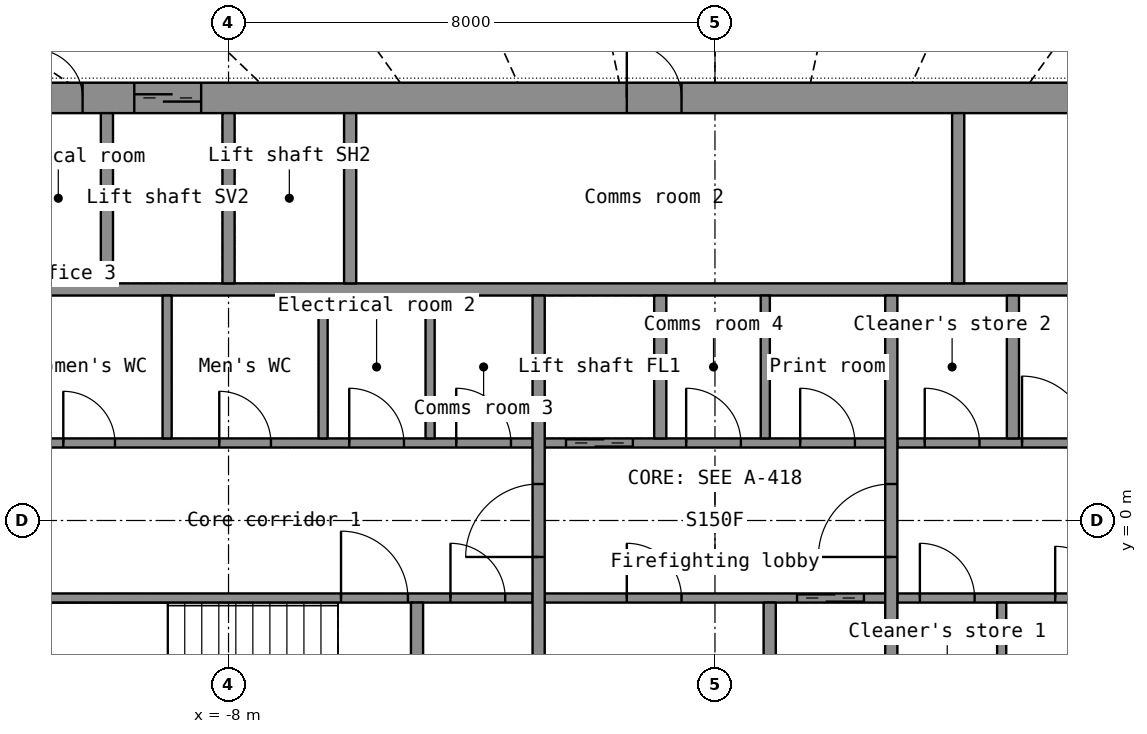
"""IFC4 building model, lengths in metres.
Left out: names, types, materials, properties, quantities, classifications, styles, units other than length and angle.
Written with IfcOpenShell. Run it as: python <this file> out.ifc"""

import sys

from ifc_helpers import new_model, si_unit, direction, frame, frame_2d, origin, place, context, subcontext, project, spatial, rectangle, extrude, element, fill, save


model = new_model("IFC4")
c1 = context("Model", 3, precision=1e-05, world=origin(), true_north=direction((0.0, 1.0)))
c2 = subcontext(c1, "Body", "Model", "MODEL_VIEW")
j1 = project(units=[si_unit("LENGTHUNIT", "METRE"), si_unit("PLANEANGLEUNIT", "RADIAN")], contexts=[c1])
p1 = place(None, origin())
s1 = spatial("IfcSite", under=j1, at=p1, CompositionType="ELEMENT")
p2 = place(p1, origin())
s2 = spatial("IfcBuilding", under=s1, at=p2, CompositionType="ELEMENT")
p3 = place(p2, frame((0.0, 0.0, 137.8)))
s3 = spatial("IfcBuildingStorey", under=s2, at=p3, CompositionType="ELEMENT", Elevation=137.8)
p4 = place(p3, frame((-11.5, 6.95, 0.0), z_axis=(0.0, 0.0, 1.0), x_axis=(1.0, 0.0, 0.0)))
e1 = element("IfcWall", 1, at=p4, inside=s3, PredefinedType="SHEAR", context=c2, shape_type="SweptSolid", body=[
    extrude(rectangle(XDim=23.0, YDim=0.5, at=frame_2d((11.5, 0.0))), origin(), (0.0, 0.0, 1.0), 3.3),
])
p5 = place(p4, frame((1.95, 0.0, 0.0)))
e2 = element("IfcOpeningElement", 2, at=p5, cuts=e1, PredefinedType="OPENING", context=c2, shape_type="SweptSolid", body=[
    extrude(rectangle(XDim=1.1, YDim=2.2, at=frame_2d((0.55, 1.1))), frame((0.0, 0.26, 0.0), z_axis=(0.0, -1.0, 0.0), x_axis=(1.0, 0.0, 0.0)), (0.0, 0.0, 1.0), 0.52),
])
p6 = place(p4, frame((10.05, 0.0, 0.0)))
e3 = element("IfcOpeningElement", 3, at=p6, cuts=e1, PredefinedType="OPENING", context=c2, shape_type="SweptSolid", body=[
    extrude(rectangle(XDim=0.9, YDim=2.1, at=frame_2d((0.45, 1.05))), frame((0.0, 0.26, 0.0), z_axis=(0.0, -1.0, 0.0), x_axis=(1.0, 0.0, 0.0)), (0.0, 0.0, 1.0), 0.52),
])
p7 = place(p4, frame((18.05, 0.0, 0.0)))
e4 = element("IfcOpeningElement", 4, at=p7, cuts=e1, PredefinedType="OPENING", context=c2, shape_type="SweptSolid", body=[
    extrude(rectangle(XDim=0.9, YDim=2.1, at=frame_2d((0.45, 1.05))), frame((0.0, 0.26, 0.0), z_axis=(0.0, -1.0, 0.0), x_axis=(1.0, 0.0, 0.0)), (0.0, 0.0, 1.0), 0.52),
])
p8 = place(p4, frame((0.3, 0.0, 0.0)))
e5 = element("IfcOpeningElement", 5, at=p8, cuts=e1, PredefinedType="OPENING", context=c2, shape_type="SweptSolid", body=[
    extrude(rectangle(XDim=0.8, YDim=2.05, at=frame_2d((0.4, 1.025))), frame((0.0, 0.26, 0.0), z_axis=(0.0, -1.0, 0.0), x_axis=(1.0, 0.0, 0.0)), (0.0, 0.0, 1.0), 0.52),
])
p9 = place(p4, frame((21.9, 0.0, 0.0)))
e6 = element("IfcOpeningElement", 6, at=p9, cuts=e1, PredefinedType="OPENING", context=c2, shape_type="SweptSolid", body=[
    extrude(rectangle(XDim=0.8, YDim=2.05, at=frame_2d((0.4, 1.025))), frame((0.0, 0.26, 0.0), z_axis=(0.0, -1.0, 0.0), x_axis=(1.0, 0.0, 0.0)), (0.0, 0.0, 1.0), 0.52),
])
p10 = place(p3, frame((-11.5, 3.8, 0.0), z_axis=(0.0, 0.0, 1.0), x_axis=(1.0, 0.0, 0.0)))
e7 = element("IfcWall", 7, at=p10, inside=s3, PredefinedType="SHEAR", context=c2, shape_type="SweptSolid", body=[
    extrude(rectangle(XDim=23.0, YDim=0.2, at=frame_2d((11.5, 0.0))), origin(), (0.0, 0.0, 1.0), 3.3),
])
for number, where, z_axis, x_axis in (
    (8, (-10.0, 3.9, 0.0), (0.0, 0.0, 1.0), (0.0, 1.0, 0.0)),
    (9, (-8.0, 3.9, 0.0), (0.0, 0.0, 1.0), (0.0, 1.0, 0.0)),
    (10, (-6.0, 3.9, 0.0), (0.0, 0.0, 1.0), (0.0, 1.0, 0.0)),
):
    element("IfcWall", number, at=place(p3, frame(where, z_axis=z_axis, x_axis=x_axis)), inside=s3, PredefinedType="SHEAR", context=c2, shape_type="SweptSolid", body=[
        extrude(rectangle(XDim=2.8, YDim=0.2, at=frame_2d((1.4, 0.0))), origin(), (0.0, 0.0, 1.0), 3.3),
    ])
p11 = place(p3, frame((4.0, 3.9, 0.0), z_axis=(0.0, 0.0, 1.0), x_axis=(0.0, 1.0, 0.0)))
e11 = element("IfcWall", 11, at=p11, inside=s3, PredefinedType="PARTITIONING", context=c2, shape_type="SweptSolid", body=[
    extrude(rectangle(XDim=2.8, YDim=0.2, at=frame_2d((1.4, 0.0))), origin(), (0.0, 0.0, 1.0), 3.3),
])
p12 = place(p3, frame((-11.5, -1.275, 0.0), z_axis=(0.0, 0.0, 1.0), x_axis=(1.0, 0.0, 0.0)))
e12 = element("IfcWall", 12, at=p12, inside=s3, PredefinedType="SHEAR", context=c2, shape_type="SweptSolid", body=[
    extrude(rectangle(XDim=8.5, YDim=0.15, at=frame_2d((4.25, 0.0))), origin(), (0.0, 0.0, 1.0), 3.3),
])
p13 = place(p12, frame((5.35, 0.0, 0.0)))
e13 = element("IfcOpeningElement", 13, at=p13, cuts=e12, PredefinedType="OPENING", context=c2, shape_type="SweptSolid", body=[
    extrude(rectangle(XDim=1.1, YDim=2.15, at=frame_2d((0.55, 1.075))), frame((0.0, 0.085, 0.0), z_axis=(0.0, -1.0, 0.0), x_axis=(1.0, 0.0, 0.0)), (0.0, 0.0, 1.0), 0.17),
])
p14 = place(p12, frame((7.15, 0.0, 0.0)))
e14 = element("IfcOpeningElement", 14, at=p14, cuts=e12, PredefinedType="OPENING", context=c2, shape_type="SweptSolid", body=[
    extrude(rectangle(XDim=0.9, YDim=2.1, at=frame_2d((0.45, 1.05))), frame((0.0, 0.085, 0.0), z_axis=(0.0, -1.0, 0.0), x_axis=(1.0, 0.0, 0.0)), (0.0, 0.0, 1.0), 0.17),
])
p15 = place(p3, frame((-2.8, -1.275, 0.0), z_axis=(0.0, 0.0, 1.0), x_axis=(1.0, 0.0, 0.0)))
e15 = element("IfcWall", 15, at=p15, inside=s3, PredefinedType="SHEAR", context=c2, shape_type="SweptSolid", body=[
    extrude(rectangle(XDim=5.6, YDim=0.15, at=frame_2d((2.8, 0.0))), origin(), (0.0, 0.0, 1.0), 3.3),
])
p16 = place(p15, frame((4.15, 0.0, 0.0)))
e16 = element("IfcOpeningElement", 16, at=p16, cuts=e15, PredefinedType="OPENING", context=c2, shape_type="SweptSolid", body=[
    extrude(rectangle(XDim=1.1, YDim=2.2, at=frame_2d((0.55, 1.1))), frame((0.0, 0.085, 0.0), z_axis=(0.0, -1.0, 0.0), x_axis=(1.0, 0.0, 0.0)), (0.0, 0.0, 1.0), 0.17),
])
p17 = place(p15, frame((1.35, 0.0, 0.0)))
e17 = element("IfcOpeningElement", 17, at=p17, cuts=e15, PredefinedType="OPENING", context=c2, shape_type="SweptSolid", body=[
    extrude(rectangle(XDim=0.9, YDim=2.1, at=frame_2d((0.45, 1.05))), frame((0.0, 0.085, 0.0), z_axis=(0.0, -1.0, 0.0), x_axis=(1.0, 0.0, 0.0)), (0.0, 0.0, 1.0), 0.17),
])
p18 = place(p3, frame((3.0, -1.275, 0.0), z_axis=(0.0, 0.0, 1.0), x_axis=(1.0, 0.0, 0.0)))
e18 = element("IfcWall", 18, at=p18, inside=s3, PredefinedType="PARTITIONING", context=c2, shape_type="SweptSolid", body=[
    extrude(rectangle(XDim=8.5, YDim=0.15, at=frame_2d((4.25, 0.0))), origin(), (0.0, 0.0, 1.0), 3.3),
])
p19 = place(p18, frame((0.37, 0.0, 0.0)))
e19 = element("IfcOpeningElement", 19, at=p19, cuts=e18, PredefinedType="OPENING", context=c2, shape_type="SweptSolid", body=[
    extrude(rectangle(XDim=0.9, YDim=2.1, at=frame_2d((0.45, 1.05))), frame((0.0, 0.085, 0.0), z_axis=(0.0, -1.0, 0.0), x_axis=(1.0, 0.0, 0.0)), (0.0, 0.0, 1.0), 0.17),
])
p20 = place(p18, frame((2.595, 0.0, 0.0)))
e20 = element("IfcOpeningElement", 20, at=p20, cuts=e18, PredefinedType="OPENING", context=c2, shape_type="SweptSolid", body=[
    extrude(rectangle(XDim=0.85, YDim=2.1, at=frame_2d((0.425, 1.05))), frame((0.0, 0.085, 0.0), z_axis=(0.0, -1.0, 0.0), x_axis=(1.0, 0.0, 0.0)), (0.0, 0.0, 1.0), 0.17),
])
p21 = place(p18, frame((6.025, 0.0, 0.0)))
e21 = element("IfcOpeningElement", 21, at=p21, cuts=e18, PredefinedType="OPENING", context=c2, shape_type="SweptSolid", body=[
    extrude(rectangle(XDim=0.85, YDim=2.1, at=frame_2d((0.425, 1.05))), frame((0.0, 0.085, 0.0), z_axis=(0.0, -1.0, 0.0), x_axis=(1.0, 0.0, 0.0)), (0.0, 0.0, 1.0), 0.17),
])
p22 = place(p3, frame((-11.5, 1.275, 0.0), z_axis=(0.0, 0.0, 1.0), x_axis=(1.0, 0.0, 0.0)))
e22 = element("IfcWall", 22, at=p22, inside=s3, PredefinedType="PARTITIONING", context=c2, shape_type="SweptSolid", body=[
    extrude(rectangle(XDim=8.5, YDim=0.15, at=frame_2d((4.25, 0.0))), origin(), (0.0, 0.0, 1.0), 3.3),
])
p23 = place(p22, frame((0.782, 0.0, 0.0)))
e23 = element("IfcOpeningElement", 23, at=p23, cuts=e22, PredefinedType="OPENING", context=c2, shape_type="SweptSolid", body=[
    extrude(rectangle(XDim=0.85, YDim=2.1, at=frame_2d((0.425, 1.05))), frame((0.0, 0.085, 0.0), z_axis=(0.0, -1.0, 0.0), x_axis=(1.0, 0.0, 0.0)), (0.0, 0.0, 1.0), 0.17),
])
p24 = place(p22, frame((3.347, 0.0, 0.0)))
e24 = element("IfcOpeningElement", 24, at=p24, cuts=e22, PredefinedType="OPENING", context=c2, shape_type="SweptSolid", body=[
    extrude(rectangle(XDim=0.85, YDim=2.1, at=frame_2d((0.425, 1.05))), frame((0.0, 0.085, 0.0), z_axis=(0.0, -1.0, 0.0), x_axis=(1.0, 0.0, 0.0)), (0.0, 0.0, 1.0), 0.17),
])
p25 = place(p22, frame((5.485, 0.0, 0.0)))
e25 = element("IfcOpeningElement", 25, at=p25, cuts=e22, PredefinedType="OPENING", context=c2, shape_type="SweptSolid", body=[
    extrude(rectangle(XDim=0.9, YDim=2.1, at=frame_2d((0.45, 1.05))), frame((0.0, 0.085, 0.0), z_axis=(0.0, -1.0, 0.0), x_axis=(1.0, 0.0, 0.0)), (0.0, 0.0, 1.0), 0.17),
])
p26 = place(p22, frame((7.245, 0.0, 0.0)))
e26 = element("IfcOpeningElement", 26, at=p26, cuts=e22, PredefinedType="OPENING", context=c2, shape_type="SweptSolid", body=[
    extrude(rectangle(XDim=0.9, YDim=2.1, at=frame_2d((0.45, 1.05))), frame((0.0, 0.085, 0.0), z_axis=(0.0, -1.0, 0.0), x_axis=(1.0, 0.0, 0.0)), (0.0, 0.0, 1.0), 0.17),
])
p27 = place(p3, frame((-2.8, 1.275, 0.0), z_axis=(0.0, 0.0, 1.0), x_axis=(1.0, 0.0, 0.0)))
e27 = element("IfcWall", 27, at=p27, inside=s3, PredefinedType="SHEAR", context=c2, shape_type="SweptSolid", body=[
    extrude(rectangle(XDim=5.6, YDim=0.15, at=frame_2d((2.8, 0.0))), origin(), (0.0, 0.0, 1.0), 3.3),
])
p28 = place(p27, frame((0.35, 0.0, 0.0)))
e28 = element("IfcOpeningElement", 28, at=p28, cuts=e27, PredefinedType="OPENING", context=c2, shape_type="SweptSolid", body=[
    extrude(rectangle(XDim=1.1, YDim=2.2, at=frame_2d((0.55, 1.1))), frame((0.0, 0.085, 0.0), z_axis=(0.0, -1.0, 0.0), x_axis=(1.0, 0.0, 0.0)), (0.0, 0.0, 1.0), 0.17),
])
p29 = place(p27, frame((2.326, 0.0, 0.0)))
e29 = element("IfcOpeningElement", 29, at=p29, cuts=e27, PredefinedType="OPENING", context=c2, shape_type="SweptSolid", body=[
    extrude(rectangle(XDim=0.9, YDim=2.1, at=frame_2d((0.45, 1.05))), frame((0.0, 0.085, 0.0), z_axis=(0.0, -1.0, 0.0), x_axis=(1.0, 0.0, 0.0)), (0.0, 0.0, 1.0), 0.17),
])
p30 = place(p27, frame((4.201, 0.0, 0.0)))
e30 = element("IfcOpeningElement", 30, at=p30, cuts=e27, PredefinedType="OPENING", context=c2, shape_type="SweptSolid", body=[
    extrude(rectangle(XDim=0.9, YDim=2.1, at=frame_2d((0.45, 1.05))), frame((0.0, 0.085, 0.0), z_axis=(0.0, -1.0, 0.0), x_axis=(1.0, 0.0, 0.0)), (0.0, 0.0, 1.0), 0.17),
])
p31 = place(p3, frame((3.0, 1.275, 0.0), z_axis=(0.0, 0.0, 1.0), x_axis=(1.0, 0.0, 0.0)))
e31 = element("IfcWall", 31, at=p31, inside=s3, PredefinedType="SHEAR", context=c2, shape_type="SweptSolid", body=[
    extrude(rectangle(XDim=8.5, YDim=0.15, at=frame_2d((4.25, 0.0))), origin(), (0.0, 0.0, 1.0), 3.3),
])
p32 = place(p31, frame((2.05, 0.0, 0.0)))
e32 = element("IfcOpeningElement", 32, at=p32, cuts=e31, PredefinedType="OPENING", context=c2, shape_type="SweptSolid", body=[
    extrude(rectangle(XDim=1.1, YDim=2.15, at=frame_2d((0.55, 1.075))), frame((0.0, 0.085, 0.0), z_axis=(0.0, -1.0, 0.0), x_axis=(1.0, 0.0, 0.0)), (0.0, 0.0, 1.0), 0.17),
])
p33 = place(p31, frame((0.45, 0.0, 0.0)))
e33 = element("IfcOpeningElement", 33, at=p33, cuts=e31, PredefinedType="OPENING", context=c2, shape_type="SweptSolid", body=[
    extrude(rectangle(XDim=0.9, YDim=2.1, at=frame_2d((0.45, 1.05))), frame((0.0, 0.085, 0.0), z_axis=(0.0, -1.0, 0.0), x_axis=(1.0, 0.0, 0.0)), (0.0, 0.0, 1.0), 0.17),
])
p34 = place(p3, frame((-2.9, -3.7, 0.0), z_axis=(0.0, 0.0, 1.0), x_axis=(0.0, 1.0, 0.0)))
e34 = element("IfcWall", 34, at=p34, inside=s3, PredefinedType="SHEAR", context=c2, shape_type="SweptSolid", body=[
    extrude(rectangle(XDim=7.4, YDim=0.2, at=frame_2d((3.7, 0.0))), origin(), (0.0, 0.0, 1.0), 3.3),
])
p35 = place(p34, frame((3.1, 0.0, 0.0)))
e35 = element("IfcOpeningElement", 35, at=p35, cuts=e34, PredefinedType="OPENING", context=c2, shape_type="SweptSolid", body=[
    extrude(rectangle(XDim=1.2, YDim=2.2, at=frame_2d((0.6, 1.1))), frame((0.0, 0.11, 0.0), z_axis=(0.0, -1.0, 0.0), x_axis=(1.0, 0.0, 0.0)), (0.0, 0.0, 1.0), 0.22),
])
p36 = place(p3, frame((2.9, -3.7, 0.0), z_axis=(0.0, 0.0, 1.0), x_axis=(0.0, 1.0, 0.0)))
e36 = element("IfcWall", 36, at=p36, inside=s3, PredefinedType="SHEAR", context=c2, shape_type="SweptSolid", body=[
    extrude(rectangle(XDim=7.4, YDim=0.2, at=frame_2d((3.7, 0.0))), origin(), (0.0, 0.0, 1.0), 3.3),
])
p37 = place(p36, frame((3.1, 0.0, 0.0)))
e37 = element("IfcOpeningElement", 37, at=p37, cuts=e36, PredefinedType="OPENING", context=c2, shape_type="SweptSolid", body=[
    extrude(rectangle(XDim=1.2, YDim=2.2, at=frame_2d((0.6, 1.1))), frame((0.0, 0.11, 0.0), z_axis=(0.0, -1.0, 0.0), x_axis=(1.0, 0.0, 0.0)), (0.0, 0.0, 1.0), 0.22),
])
for number, where, z_axis, x_axis in (
    (38, (-0.9, 1.35, 0.0), (0.0, 0.0, 1.0), (0.0, 1.0, 0.0)),
    (39, (0.9, -3.7, 0.0), (0.0, 0.0, 1.0), (0.0, 1.0, 0.0)),
    (40, (-4.9, -3.7, 0.0), (0.0, 0.0, 1.0), (0.0, 1.0, 0.0)),
    (41, (4.9, 1.35, 0.0), (0.0, 0.0, 1.0), (0.0, 1.0, 0.0)),
):
    element("IfcWall", number, at=place(p3, frame(where, z_axis=z_axis, x_axis=x_axis)), inside=s3, PredefinedType="SHEAR", context=c2, shape_type="SweptSolid", body=[
        extrude(rectangle(XDim=2.35, YDim=0.2, at=frame_2d((1.175, 0.0))), origin(), (0.0, 0.0, 1.0), 3.3),
    ])
for number, where, z_axis, x_axis in (
    (42, (-9.01, 1.35, 0.0), (0.0, 0.0, 1.0), (0.0, 1.0, 0.0)),
    (43, (-6.445, 1.35, 0.0), (0.0, 0.0, 1.0), (0.0, 1.0, 0.0)),
    (44, (-4.685, 1.35, 0.0), (0.0, 0.0, 1.0), (0.0, 1.0, 0.0)),
    (45, (4.715, -3.7, 0.0), (0.0, 0.0, 1.0), (0.0, 1.0, 0.0)),
    (46, (0.827, 1.35, 0.0), (0.0, 0.0, 1.0), (0.0, 1.0, 0.0)),
):
    element("IfcWall", number, at=place(p3, frame(where, z_axis=z_axis, x_axis=x_axis)), inside=s3, PredefinedType="PARTITIONING", context=c2, shape_type="SweptSolid", body=[
        extrude(rectangle(XDim=2.35, YDim=0.15, at=frame_2d((1.175, 0.0))), origin(), (0.0, 0.0, 1.0), 3.3),
    ])
p38 = place(p5, origin())
e47 = element("IfcDoor", 47, at=p38, inside=s3, OperationType="DOUBLE_DOOR_SLIDING", PredefinedType="DOOR", context=c2, shape_type="SweptSolid", body=[
    extrude(rectangle(XDim=1.1, YDim=2.2, at=frame_2d((0.55, 1.1))), frame((0.0, 0.025, 0.0), z_axis=(0.0, -1.0, 0.0), x_axis=(1.0, 0.0, 0.0)), (0.0, 0.0, 1.0), 0.05),
])
fill(e2, e47)
p39 = place(p6, origin())
e48 = element("IfcDoor", 48, at=p39, inside=s3, OperationType="SINGLE_SWING_LEFT", PredefinedType="DOOR", context=c2, shape_type="SweptSolid", body=[
    extrude(rectangle(XDim=0.9, YDim=2.1, at=frame_2d((0.45, 1.05))), frame((0.0, 0.025, 0.0), z_axis=(0.0, -1.0, 0.0), x_axis=(1.0, 0.0, 0.0)), (0.0, 0.0, 1.0), 0.05),
])
fill(e3, e48)
p40 = place(p8, origin())
e49 = element("IfcDoor", 49, at=p40, inside=s3, OperationType="SINGLE_SWING_LEFT", PredefinedType="DOOR", context=c2, shape_type="SweptSolid", body=[
    extrude(rectangle(XDim=0.8, YDim=2.05, at=frame_2d((0.4, 1.025))), frame((0.0, 0.025, 0.0), z_axis=(0.0, -1.0, 0.0), x_axis=(1.0, 0.0, 0.0)), (0.0, 0.0, 1.0), 0.05),
])
fill(e5, e49)
p41 = place(p35, origin())
e50 = element("IfcDoor", 50, at=p41, inside=s3, OperationType="SINGLE_SWING_LEFT", PredefinedType="DOOR", context=c2, shape_type="SweptSolid", body=[
    extrude(rectangle(XDim=1.2, YDim=2.2, at=frame_2d((0.6, 1.1))), frame((0.0, 0.025, 0.0), z_axis=(0.0, -1.0, 0.0), x_axis=(1.0, 0.0, 0.0)), (0.0, 0.0, 1.0), 0.05),
])
fill(e35, e50)
p42 = place(p37, origin())
e51 = element("IfcDoor", 51, at=p42, inside=s3, OperationType="SINGLE_SWING_LEFT", PredefinedType="DOOR", context=c2, shape_type="SweptSolid", body=[
    extrude(rectangle(XDim=1.2, YDim=2.2, at=frame_2d((0.6, 1.1))), frame((0.0, 0.025, 0.0), z_axis=(0.0, -1.0, 0.0), x_axis=(1.0, 0.0, 0.0)), (0.0, 0.0, 1.0), 0.05),
])
fill(e37, e51)
p43 = place(p28, origin())
e52 = element("IfcDoor", 52, at=p43, inside=s3, OperationType="DOUBLE_DOOR_SLIDING", PredefinedType="DOOR", context=c2, shape_type="SweptSolid", body=[
    extrude(rectangle(XDim=1.1, YDim=2.2, at=frame_2d((0.55, 1.1))), frame((0.0, 0.025, 0.0), z_axis=(0.0, -1.0, 0.0), x_axis=(1.0, 0.0, 0.0)), (0.0, 0.0, 1.0), 0.05),
])
fill(e28, e52)
p44 = place(p16, origin())
e53 = element("IfcDoor", 53, at=p44, inside=s3, OperationType="DOUBLE_DOOR_SLIDING", PredefinedType="DOOR", context=c2, shape_type="SweptSolid", body=[
    extrude(rectangle(XDim=1.1, YDim=2.2, at=frame_2d((0.55, 1.1))), frame((0.0, 0.025, 0.0), z_axis=(0.0, -1.0, 0.0), x_axis=(1.0, 0.0, 0.0)), (0.0, 0.0, 1.0), 0.05),
])
fill(e16, e53)
p45 = place(p13, origin())
e54 = element("IfcDoor", 54, at=p45, inside=s3, OperationType="SINGLE_SWING_LEFT", PredefinedType="DOOR", context=c2, shape_type="SweptSolid", body=[
    extrude(rectangle(XDim=1.1, YDim=2.15, at=frame_2d((0.55, 1.075))), frame((0.0, 0.025, 0.0), z_axis=(0.0, -1.0, 0.0), x_axis=(1.0, 0.0, 0.0)), (0.0, 0.0, 1.0), 0.05),
])
fill(e13, e54)
p46 = place(p32, origin())
e55 = element("IfcDoor", 55, at=p46, inside=s3, OperationType="SINGLE_SWING_LEFT", PredefinedType="DOOR", context=c2, shape_type="SweptSolid", body=[
    extrude(rectangle(XDim=1.1, YDim=2.15, at=frame_2d((0.55, 1.075))), frame((0.0, 0.025, 0.0), z_axis=(0.0, -1.0, 0.0), x_axis=(1.0, 0.0, 0.0)), (0.0, 0.0, 1.0), 0.05),
])
fill(e32, e55)
p47 = place(p23, origin())
e56 = element("IfcDoor", 56, at=p47, inside=s3, OperationType="SINGLE_SWING_LEFT", PredefinedType="DOOR", context=c2, shape_type="SweptSolid", body=[
    extrude(rectangle(XDim=0.85, YDim=2.1, at=frame_2d((0.425, 1.05))), frame((0.0, 0.025, 0.0), z_axis=(0.0, -1.0, 0.0), x_axis=(1.0, 0.0, 0.0)), (0.0, 0.0, 1.0), 0.05),
])
fill(e23, e56)
p48 = place(p24, origin())
e57 = element("IfcDoor", 57, at=p48, inside=s3, OperationType="SINGLE_SWING_LEFT", PredefinedType="DOOR", context=c2, shape_type="SweptSolid", body=[
    extrude(rectangle(XDim=0.85, YDim=2.1, at=frame_2d((0.425, 1.05))), frame((0.0, 0.025, 0.0), z_axis=(0.0, -1.0, 0.0), x_axis=(1.0, 0.0, 0.0)), (0.0, 0.0, 1.0), 0.05),
])
fill(e24, e57)
p49 = place(p25, origin())
e58 = element("IfcDoor", 58, at=p49, inside=s3, OperationType="SINGLE_SWING_LEFT", PredefinedType="DOOR", context=c2, shape_type="SweptSolid", body=[
    extrude(rectangle(XDim=0.9, YDim=2.1, at=frame_2d((0.45, 1.05))), frame((0.0, 0.025, 0.0), z_axis=(0.0, -1.0, 0.0), x_axis=(1.0, 0.0, 0.0)), (0.0, 0.0, 1.0), 0.05),
])
fill(e25, e58)
p50 = place(p26, origin())
e59 = element("IfcDoor", 59, at=p50, inside=s3, OperationType="SINGLE_SWING_LEFT", PredefinedType="DOOR", context=c2, shape_type="SweptSolid", body=[
    extrude(rectangle(XDim=0.9, YDim=2.1, at=frame_2d((0.45, 1.05))), frame((0.0, 0.025, 0.0), z_axis=(0.0, -1.0, 0.0), x_axis=(1.0, 0.0, 0.0)), (0.0, 0.0, 1.0), 0.05),
])
fill(e26, e59)
p51 = place(p19, origin())
e60 = element("IfcDoor", 60, at=p51, inside=s3, OperationType="SINGLE_SWING_LEFT", PredefinedType="DOOR", context=c2, shape_type="SweptSolid", body=[
    extrude(rectangle(XDim=0.9, YDim=2.1, at=frame_2d((0.45, 1.05))), frame((0.0, 0.025, 0.0), z_axis=(0.0, -1.0, 0.0), x_axis=(1.0, 0.0, 0.0)), (0.0, 0.0, 1.0), 0.05),
])
fill(e19, e60)
p52 = place(p20, origin())
e61 = element("IfcDoor", 61, at=p52, inside=s3, OperationType="SINGLE_SWING_LEFT", PredefinedType="DOOR", context=c2, shape_type="SweptSolid", body=[
    extrude(rectangle(XDim=0.85, YDim=2.1, at=frame_2d((0.425, 1.05))), frame((0.0, 0.025, 0.0), z_axis=(0.0, -1.0, 0.0), x_axis=(1.0, 0.0, 0.0)), (0.0, 0.0, 1.0), 0.05),
])
fill(e20, e61)
p53 = place(p29, origin())
e62 = element("IfcDoor", 62, at=p53, inside=s3, OperationType="SINGLE_SWING_LEFT", PredefinedType="DOOR", context=c2, shape_type="SweptSolid", body=[
    extrude(rectangle(XDim=0.9, YDim=2.1, at=frame_2d((0.45, 1.05))), frame((0.0, 0.025, 0.0), z_axis=(0.0, -1.0, 0.0), x_axis=(1.0, 0.0, 0.0)), (0.0, 0.0, 1.0), 0.05),
])
fill(e29, e62)
p54 = place(p30, origin())
e63 = element("IfcDoor", 63, at=p54, inside=s3, OperationType="SINGLE_SWING_LEFT", PredefinedType="DOOR", context=c2, shape_type="SweptSolid", body=[
    extrude(rectangle(XDim=0.9, YDim=2.1, at=frame_2d((0.45, 1.05))), frame((0.0, 0.025, 0.0), z_axis=(0.0, -1.0, 0.0), x_axis=(1.0, 0.0, 0.0)), (0.0, 0.0, 1.0), 0.05),
])
fill(e30, e63)
p55 = place(p17, origin())
e64 = element("IfcDoor", 64, at=p55, inside=s3, OperationType="SINGLE_SWING_LEFT", PredefinedType="DOOR", context=c2, shape_type="SweptSolid", body=[
    extrude(rectangle(XDim=0.9, YDim=2.1, at=frame_2d((0.45, 1.05))), frame((0.0, 0.025, 0.0), z_axis=(0.0, -1.0, 0.0), x_axis=(1.0, 0.0, 0.0)), (0.0, 0.0, 1.0), 0.05),
])
fill(e17, e64)
p56 = place(p33, origin())
e65 = element("IfcDoor", 65, at=p56, inside=s3, OperationType="SINGLE_SWING_LEFT", PredefinedType="DOOR", context=c2, shape_type="SweptSolid", body=[
    extrude(rectangle(XDim=0.9, YDim=2.1, at=frame_2d((0.45, 1.05))), frame((0.0, 0.025, 0.0), z_axis=(0.0, -1.0, 0.0), x_axis=(1.0, 0.0, 0.0)), (0.0, 0.0, 1.0), 0.05),
])
fill(e33, e65)
p57 = place(p14, origin())
e66 = element("IfcDoor", 66, at=p57, inside=s3, OperationType="SINGLE_SWING_LEFT", PredefinedType="DOOR", context=c2, shape_type="SweptSolid", body=[
    extrude(rectangle(XDim=0.9, YDim=2.1, at=frame_2d((0.45, 1.05))), frame((0.0, 0.025, 0.0), z_axis=(0.0, -1.0, 0.0), x_axis=(1.0, 0.0, 0.0)), (0.0, 0.0, 1.0), 0.05),
])
fill(e14, e66)
save(model, sys.argv[1])
